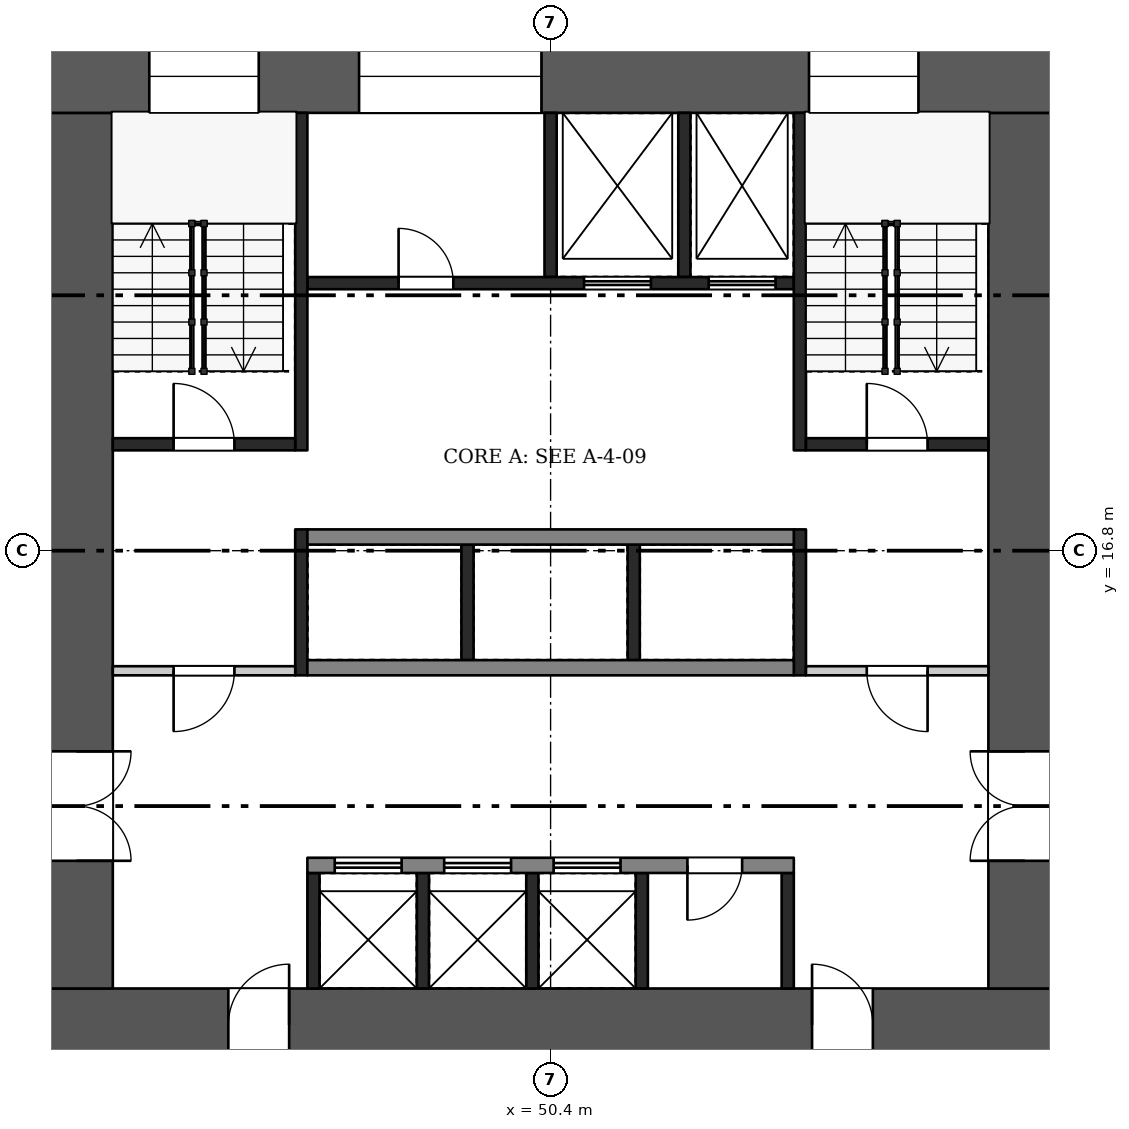
"""IFC4 building model, lengths in metres.
Left out: names, types, materials, properties, quantities, classifications, styles, units other than length and angle.
Written with IfcOpenShell. Run it as: python <this file> out.ifc"""

import sys

from ifc_helpers import new_model, si_unit, direction, frame, frame_2d, origin, place, context, subcontext, project, spatial, rectangle, extrude, element, fill, save


model = new_model("IFC4")
c1 = context("Model", 3, precision=1e-05, world=origin(), true_north=direction((0.0, 1.0)))
c2 = subcontext(c1, "Body", "Model", "MODEL_VIEW")
j1 = project(units=[si_unit("LENGTHUNIT", "METRE"), si_unit("PLANEANGLEUNIT", "RADIAN")], contexts=[c1])
p1 = place(None, origin())
s1 = spatial("IfcSite", under=j1, at=p1, CompositionType="ELEMENT")
p2 = place(p1, origin())
s2 = spatial("IfcBuilding", under=s1, at=p2, CompositionType="ELEMENT")
p3 = place(p2, frame((0.0, 0.0, 25.2)))
s3 = spatial("IfcBuildingStorey", under=s2, at=p3, CompositionType="ELEMENT", Elevation=25.2)
p4 = place(p3, frame((42.0, 9.0, 0.0), z_axis=(0.0, 0.0, 1.0), x_axis=(1.0, 0.0, 0.0)))
e1 = element("IfcWall", 1, at=p4, inside=s3, PredefinedType="SHEAR", context=c2, shape_type="SweptSolid", body=[
    extrude(rectangle(XDim=16.8, YDim=1.2, at=frame_2d((8.4, 0.0))), origin(), (0.0, 0.0, 1.0), 3.22),
])
p5 = place(p4, frame((3.1, 0.0, 0.0)))
e2 = element("IfcOpeningElement", 2, at=p5, cuts=e1, PredefinedType="OPENING", context=c2, shape_type="SweptSolid", body=[
    extrude(rectangle(XDim=1.0, YDim=2.1, at=frame_2d((0.5, 1.05))), frame((0.0, 0.61, 0.0), z_axis=(0.0, -1.0, 0.0), x_axis=(1.0, 0.0, 0.0)), (0.0, 0.0, 1.0), 1.22),
])
p6 = place(p4, frame((12.7, 0.0, 0.0)))
e3 = element("IfcOpeningElement", 3, at=p6, cuts=e1, PredefinedType="OPENING", context=c2, shape_type="SweptSolid", body=[
    extrude(rectangle(XDim=1.0, YDim=2.1, at=frame_2d((0.5, 1.05))), frame((0.0, 0.61, 0.0), z_axis=(0.0, -1.0, 0.0), x_axis=(1.0, 0.0, 0.0)), (0.0, 0.0, 1.0), 1.22),
])
p7 = place(p3, frame((42.0, 24.6, 0.0), z_axis=(0.0, 0.0, 1.0), x_axis=(1.0, 0.0, 0.0)))
e4 = element("IfcWall", 4, at=p7, inside=s3, PredefinedType="SHEAR", context=c2, shape_type="SweptSolid", body=[
    extrude(rectangle(XDim=16.8, YDim=1.2, at=frame_2d((8.4, 0.0))), origin(), (0.0, 0.0, 1.0), 3.22),
])
p8 = place(p7, frame((1.8, 0.0, 0.5)))
e5 = element("IfcOpeningElement", 5, at=p8, cuts=e4, PredefinedType="OPENING", context=c2, shape_type="SweptSolid", body=[
    extrude(rectangle(XDim=1.8, YDim=2.4, at=frame_2d((0.9, 1.2))), frame((0.0, 0.61, 0.0), z_axis=(0.0, -1.0, 0.0), x_axis=(1.0, 0.0, 0.0)), (0.0, 0.0, 1.0), 1.22),
])
p9 = place(p7, frame((5.25, 0.0, 1.6)))
e6 = element("IfcOpeningElement", 6, at=p9, cuts=e4, PredefinedType="OPENING", context=c2, shape_type="SweptSolid", body=[
    extrude(rectangle(XDim=3.0, YDim=1.2, at=frame_2d((1.5, 0.6))), frame((0.0, 0.61, 0.0), z_axis=(0.0, -1.0, 0.0), x_axis=(1.0, 0.0, 0.0)), (0.0, 0.0, 1.0), 1.22),
])
p10 = place(p7, frame((12.65, 0.0, 0.5)))
e7 = element("IfcOpeningElement", 7, at=p10, cuts=e4, PredefinedType="OPENING", context=c2, shape_type="SweptSolid", body=[
    extrude(rectangle(XDim=1.8, YDim=2.4, at=frame_2d((0.9, 1.2))), frame((0.0, 0.61, 0.0), z_axis=(0.0, -1.0, 0.0), x_axis=(1.0, 0.0, 0.0)), (0.0, 0.0, 1.0), 1.22),
])
p11 = place(p3, frame((42.6, 9.6, 0.0), z_axis=(0.0, 0.0, 1.0), x_axis=(0.0, 1.0, 0.0)))
e8 = element("IfcWall", 8, at=p11, inside=s3, PredefinedType="SHEAR", context=c2, shape_type="SweptSolid", body=[
    extrude(rectangle(XDim=14.4, YDim=1.2, at=frame_2d((7.2, 0.0))), origin(), (0.0, 0.0, 1.0), 3.22),
])
p12 = place(p11, frame((2.1, 0.0, 0.0)))
e9 = element("IfcOpeningElement", 9, at=p12, cuts=e8, PredefinedType="OPENING", context=c2, shape_type="SweptSolid", body=[
    extrude(rectangle(XDim=1.8, YDim=2.1, at=frame_2d((0.9, 1.05))), frame((0.0, 0.61, 0.0), z_axis=(0.0, -1.0, 0.0), x_axis=(1.0, 0.0, 0.0)), (0.0, 0.0, 1.0), 1.22),
])
p13 = place(p3, frame((58.2, 9.6, 0.0), z_axis=(0.0, 0.0, 1.0), x_axis=(0.0, 1.0, 0.0)))
e10 = element("IfcWall", 10, at=p13, inside=s3, PredefinedType="SHEAR", context=c2, shape_type="SweptSolid", body=[
    extrude(rectangle(XDim=14.4, YDim=1.2, at=frame_2d((7.2, 0.0))), origin(), (0.0, 0.0, 1.0), 3.22),
])
p14 = place(p13, frame((2.1, 0.0, 0.0)))
e11 = element("IfcOpeningElement", 11, at=p14, cuts=e10, PredefinedType="OPENING", context=c2, shape_type="SweptSolid", body=[
    extrude(rectangle(XDim=1.8, YDim=2.1, at=frame_2d((0.9, 1.05))), frame((0.0, 0.61, 0.0), z_axis=(0.0, -1.0, 0.0), x_axis=(1.0, 0.0, 0.0)), (0.0, 0.0, 1.0), 1.22),
])
for number, where, z_axis, x_axis in (
    (12, (46.5, 9.6, 0.0), (0.0, 0.0, 1.0), (0.0, 1.0, 0.0)),
    (13, (48.3, 9.6, 0.0), (0.0, 0.0, 1.0), (0.0, 1.0, 0.0)),
    (14, (50.1, 9.6, 0.0), (0.0, 0.0, 1.0), (0.0, 1.0, 0.0)),
    (15, (51.9, 9.6, 0.0), (0.0, 0.0, 1.0), (0.0, 1.0, 0.0)),
    (16, (54.3, 9.6, 0.0), (0.0, 0.0, 1.0), (0.0, 1.0, 0.0)),
):
    element("IfcWall", number, at=place(p3, frame(where, z_axis=z_axis, x_axis=x_axis)), inside=s3, PredefinedType="SHEAR", context=c2, shape_type="SweptSolid", body=[
        extrude(rectangle(XDim=1.9, YDim=0.2, at=frame_2d((0.95, 0.0))), origin(), (0.0, 0.0, 1.0), 3.22),
    ])
p15 = place(p3, frame((46.4, 11.625, 0.0), z_axis=(0.0, 0.0, 1.0), x_axis=(1.0, 0.0, 0.0)))
e17 = element("IfcWall", 17, at=p15, inside=s3, PredefinedType="SHEAR", context=c2, shape_type="SweptSolid", body=[
    extrude(rectangle(XDim=8.0, YDim=0.25, at=frame_2d((4.0, 0.0))), origin(), (0.0, 0.0, 1.0), 3.22),
])
p16 = place(p15, frame((0.45, 0.0, 0.0)))
e18 = element("IfcOpeningElement", 18, at=p16, cuts=e17, PredefinedType="OPENING", context=c2, shape_type="SweptSolid", body=[
    extrude(rectangle(XDim=1.1, YDim=2.1, at=frame_2d((0.55, 1.05))), frame((0.0, 0.135, 0.0), z_axis=(0.0, -1.0, 0.0), x_axis=(1.0, 0.0, 0.0)), (0.0, 0.0, 1.0), 0.27),
])
p17 = place(p15, frame((2.25, 0.0, 0.0)))
e19 = element("IfcOpeningElement", 19, at=p17, cuts=e17, PredefinedType="OPENING", context=c2, shape_type="SweptSolid", body=[
    extrude(rectangle(XDim=1.1, YDim=2.1, at=frame_2d((0.55, 1.05))), frame((0.0, 0.135, 0.0), z_axis=(0.0, -1.0, 0.0), x_axis=(1.0, 0.0, 0.0)), (0.0, 0.0, 1.0), 0.27),
])
p18 = place(p15, frame((4.05, 0.0, 0.0)))
e20 = element("IfcOpeningElement", 20, at=p18, cuts=e17, PredefinedType="OPENING", context=c2, shape_type="SweptSolid", body=[
    extrude(rectangle(XDim=1.1, YDim=2.1, at=frame_2d((0.55, 1.05))), frame((0.0, 0.135, 0.0), z_axis=(0.0, -1.0, 0.0), x_axis=(1.0, 0.0, 0.0)), (0.0, 0.0, 1.0), 0.27),
])
p19 = place(p15, frame((6.25, 0.0, 0.0)))
e21 = element("IfcOpeningElement", 21, at=p19, cuts=e17, PredefinedType="OPENING", context=c2, shape_type="SweptSolid", body=[
    extrude(rectangle(XDim=0.9, YDim=2.1, at=frame_2d((0.45, 1.05))), frame((0.0, 0.135, 0.0), z_axis=(0.0, -1.0, 0.0), x_axis=(1.0, 0.0, 0.0)), (0.0, 0.0, 1.0), 0.27),
])
for number, where, z_axis, x_axis in (
    (22, (49.033, 15.0, 0.0), (0.0, 0.0, 1.0), (0.0, 1.0, 0.0)),
    (23, (51.767, 15.0, 0.0), (0.0, 0.0, 1.0), (0.0, 1.0, 0.0)),
):
    element("IfcWall", number, at=place(p3, frame(where, z_axis=z_axis, x_axis=x_axis)), inside=s3, PredefinedType="SHEAR", context=c2, shape_type="SweptSolid", body=[
        extrude(rectangle(XDim=1.9, YDim=0.2, at=frame_2d((0.95, 0.0))), origin(), (0.0, 0.0, 1.0), 3.22),
    ])
for number, where, z_axis, x_axis in (
    (24, (46.4, 14.875, 0.0), (0.0, 0.0, 1.0), (1.0, 0.0, 0.0)),
    (25, (46.4, 17.025, 0.0), (0.0, 0.0, 1.0), (1.0, 0.0, 0.0)),
):
    element("IfcWall", number, at=place(p3, frame(where, z_axis=z_axis, x_axis=x_axis)), inside=s3, PredefinedType="SHEAR", context=c2, shape_type="SweptSolid", body=[
        extrude(rectangle(XDim=8.0, YDim=0.25, at=frame_2d((4.0, 0.0))), origin(), (0.0, 0.0, 1.0), 3.22),
    ])
for number, where, z_axis, x_axis in (
    (26, (50.4, 21.3, 0.0), (0.0, 0.0, 1.0), (0.0, 1.0, 0.0)),
    (27, (52.6, 21.3, 0.0), (0.0, 0.0, 1.0), (0.0, 1.0, 0.0)),
):
    element("IfcWall", number, at=place(p3, frame(where, z_axis=z_axis, x_axis=x_axis)), inside=s3, PredefinedType="SHEAR", context=c2, shape_type="SweptSolid", body=[
        extrude(rectangle(XDim=2.7, YDim=0.2, at=frame_2d((1.35, 0.0))), origin(), (0.0, 0.0, 1.0), 3.22),
    ])
p20 = place(p3, frame((46.4, 21.2, 0.0), z_axis=(0.0, 0.0, 1.0), x_axis=(1.0, 0.0, 0.0)))
e28 = element("IfcWall", 28, at=p20, inside=s3, PredefinedType="SHEAR", context=c2, shape_type="SweptSolid", body=[
    extrude(rectangle(XDim=8.0, YDim=0.2, at=frame_2d((4.0, 0.0))), origin(), (0.0, 0.0, 1.0), 3.22),
])
p21 = place(p20, frame((1.5, 0.0, 0.0)))
e29 = element("IfcOpeningElement", 29, at=p21, cuts=e28, PredefinedType="OPENING", context=c2, shape_type="SweptSolid", body=[
    extrude(rectangle(XDim=0.9, YDim=2.1, at=frame_2d((0.45, 1.05))), frame((0.0, 0.11, 0.0), z_axis=(0.0, -1.0, 0.0), x_axis=(1.0, 0.0, 0.0)), (0.0, 0.0, 1.0), 0.22),
])
p22 = place(p20, frame((4.55, 0.0, 0.0)))
e30 = element("IfcOpeningElement", 30, at=p22, cuts=e28, PredefinedType="OPENING", context=c2, shape_type="SweptSolid", body=[
    extrude(rectangle(XDim=1.1, YDim=2.1, at=frame_2d((0.55, 1.05))), frame((0.0, 0.11, 0.0), z_axis=(0.0, -1.0, 0.0), x_axis=(1.0, 0.0, 0.0)), (0.0, 0.0, 1.0), 0.22),
])
p23 = place(p20, frame((6.6, 0.0, 0.0)))
e31 = element("IfcOpeningElement", 31, at=p23, cuts=e28, PredefinedType="OPENING", context=c2, shape_type="SweptSolid", body=[
    extrude(rectangle(XDim=1.1, YDim=2.1, at=frame_2d((0.55, 1.05))), frame((0.0, 0.11, 0.0), z_axis=(0.0, -1.0, 0.0), x_axis=(1.0, 0.0, 0.0)), (0.0, 0.0, 1.0), 0.22),
])
p24 = place(p3, frame((46.3, 14.75, 0.0), z_axis=(0.0, 0.0, 1.0), x_axis=(0.0, 1.0, 0.0)))
e32 = element("IfcWall", 32, at=p24, inside=s3, PredefinedType="SHEAR", context=c2, shape_type="SweptSolid", body=[
    extrude(rectangle(XDim=2.4, YDim=0.2, at=frame_2d((1.2, 0.0))), origin(), (0.0, 0.0, 1.0), 3.22),
])
p25 = place(p3, frame((46.3, 18.45, 0.0), z_axis=(0.0, 0.0, 1.0), x_axis=(0.0, 1.0, 0.0)))
e33 = element("IfcWall", 33, at=p25, inside=s3, PredefinedType="SHEAR", context=c2, shape_type="SweptSolid", body=[
    extrude(rectangle(XDim=5.55, YDim=0.2, at=frame_2d((2.775, 0.0))), origin(), (0.0, 0.0, 1.0), 3.22),
])
p26 = place(p3, frame((43.2, 14.825, 0.0), z_axis=(0.0, 0.0, 1.0), x_axis=(1.0, 0.0, 0.0)))
e34 = element("IfcWall", 34, at=p26, inside=s3, PredefinedType="PARTITIONING", context=c2, shape_type="SweptSolid", body=[
    extrude(rectangle(XDim=3.0, YDim=0.15, at=frame_2d((1.5, 0.0))), origin(), (0.0, 0.0, 1.0), 3.22),
])
p27 = place(p26, frame((1.0, 0.0, 0.0)))
e35 = element("IfcOpeningElement", 35, at=p27, cuts=e34, PredefinedType="OPENING", context=c2, shape_type="SweptSolid", body=[
    extrude(rectangle(XDim=1.0, YDim=2.1, at=frame_2d((0.5, 1.05))), frame((0.0, 0.085, 0.0), z_axis=(0.0, -1.0, 0.0), x_axis=(1.0, 0.0, 0.0)), (0.0, 0.0, 1.0), 0.17),
])
p28 = place(p3, frame((43.2, 18.55, 0.0), z_axis=(0.0, 0.0, 1.0), x_axis=(1.0, 0.0, 0.0)))
e36 = element("IfcWall", 36, at=p28, inside=s3, PredefinedType="SHEAR", context=c2, shape_type="SweptSolid", body=[
    extrude(rectangle(XDim=3.0, YDim=0.2, at=frame_2d((1.5, 0.0))), origin(), (0.0, 0.0, 1.0), 3.22),
])
p29 = place(p28, frame((1.0, 0.0, 0.0)))
e37 = element("IfcOpeningElement", 37, at=p29, cuts=e36, PredefinedType="OPENING", context=c2, shape_type="SweptSolid", body=[
    extrude(rectangle(XDim=1.0, YDim=2.1, at=frame_2d((0.5, 1.05))), frame((0.0, 0.11, 0.0), z_axis=(0.0, -1.0, 0.0), x_axis=(1.0, 0.0, 0.0)), (0.0, 0.0, 1.0), 0.22),
])
p30 = place(p3, frame((54.5, 14.75, 0.0), z_axis=(0.0, 0.0, 1.0), x_axis=(0.0, 1.0, 0.0)))
e38 = element("IfcWall", 38, at=p30, inside=s3, PredefinedType="SHEAR", context=c2, shape_type="SweptSolid", body=[
    extrude(rectangle(XDim=2.4, YDim=0.2, at=frame_2d((1.2, 0.0))), origin(), (0.0, 0.0, 1.0), 3.22),
])
p31 = place(p3, frame((54.5, 18.45, 0.0), z_axis=(0.0, 0.0, 1.0), x_axis=(0.0, 1.0, 0.0)))
e39 = element("IfcWall", 39, at=p31, inside=s3, PredefinedType="SHEAR", context=c2, shape_type="SweptSolid", body=[
    extrude(rectangle(XDim=5.55, YDim=0.2, at=frame_2d((2.775, 0.0))), origin(), (0.0, 0.0, 1.0), 3.22),
])
p32 = place(p3, frame((54.6, 14.825, 0.0), z_axis=(0.0, 0.0, 1.0), x_axis=(1.0, 0.0, 0.0)))
e40 = element("IfcWall", 40, at=p32, inside=s3, PredefinedType="PARTITIONING", context=c2, shape_type="SweptSolid", body=[
    extrude(rectangle(XDim=3.0, YDim=0.15, at=frame_2d((1.5, 0.0))), origin(), (0.0, 0.0, 1.0), 3.22),
])
p33 = place(p32, frame((1.0, 0.0, 0.0)))
e41 = element("IfcOpeningElement", 41, at=p33, cuts=e40, PredefinedType="OPENING", context=c2, shape_type="SweptSolid", body=[
    extrude(rectangle(XDim=1.0, YDim=2.1, at=frame_2d((0.5, 1.05))), frame((0.0, 0.085, 0.0), z_axis=(0.0, -1.0, 0.0), x_axis=(1.0, 0.0, 0.0)), (0.0, 0.0, 1.0), 0.17),
])
p34 = place(p3, frame((54.6, 18.55, 0.0), z_axis=(0.0, 0.0, 1.0), x_axis=(1.0, 0.0, 0.0)))
e42 = element("IfcWall", 42, at=p34, inside=s3, PredefinedType="SHEAR", context=c2, shape_type="SweptSolid", body=[
    extrude(rectangle(XDim=3.0, YDim=0.2, at=frame_2d((1.5, 0.0))), origin(), (0.0, 0.0, 1.0), 3.22),
])
p35 = place(p34, frame((1.0, 0.0, 0.0)))
e43 = element("IfcOpeningElement", 43, at=p35, cuts=e42, PredefinedType="OPENING", context=c2, shape_type="SweptSolid", body=[
    extrude(rectangle(XDim=1.0, YDim=2.1, at=frame_2d((0.5, 1.05))), frame((0.0, 0.11, 0.0), z_axis=(0.0, -1.0, 0.0), x_axis=(1.0, 0.0, 0.0)), (0.0, 0.0, 1.0), 0.22),
])
p36 = place(p5, origin())
e44 = element("IfcDoor", 44, at=p36, inside=s3, OperationType="SINGLE_SWING_RIGHT", PredefinedType="DOOR", context=c2, shape_type="SweptSolid", body=[
    extrude(rectangle(XDim=1.0, YDim=2.1, at=frame_2d((0.5, 1.05))), frame((0.0, 0.025, 0.0), z_axis=(0.0, -1.0, 0.0), x_axis=(1.0, 0.0, 0.0)), (0.0, 0.0, 1.0), 0.05),
])
fill(e2, e44)
p37 = place(p6, origin())
e45 = element("IfcDoor", 45, at=p37, inside=s3, OperationType="SINGLE_SWING_LEFT", PredefinedType="DOOR", context=c2, shape_type="SweptSolid", body=[
    extrude(rectangle(XDim=1.0, YDim=2.1, at=frame_2d((0.5, 1.05))), frame((0.0, 0.025, 0.0), z_axis=(0.0, -1.0, 0.0), x_axis=(1.0, 0.0, 0.0)), (0.0, 0.0, 1.0), 0.05),
])
fill(e3, e45)
p38 = place(p12, frame((1.8, 0.0, 0.0), z_axis=(0.0, 0.0, 1.0), x_axis=(-1.0, 0.0, 0.0)))
e46 = element("IfcDoor", 46, at=p38, inside=s3, OperationType="DOUBLE_DOOR_SINGLE_SWING", PredefinedType="DOOR", context=c2, shape_type="SweptSolid", body=[
    extrude(rectangle(XDim=1.8, YDim=2.1, at=frame_2d((0.9, 1.05))), frame((0.0, 0.025, 0.0), z_axis=(0.0, -1.0, 0.0), x_axis=(1.0, 0.0, 0.0)), (0.0, 0.0, 1.0), 0.05),
])
fill(e9, e46)
p39 = place(p14, origin())
e47 = element("IfcDoor", 47, at=p39, inside=s3, OperationType="DOUBLE_DOOR_SINGLE_SWING", PredefinedType="DOOR", context=c2, shape_type="SweptSolid", body=[
    extrude(rectangle(XDim=1.8, YDim=2.1, at=frame_2d((0.9, 1.05))), frame((0.0, 0.025, 0.0), z_axis=(0.0, -1.0, 0.0), x_axis=(1.0, 0.0, 0.0)), (0.0, 0.0, 1.0), 0.05),
])
fill(e11, e47)
p40 = place(p16, origin())
e48 = element("IfcDoor", 48, at=p40, inside=s3, OperationType="DOUBLE_DOOR_SLIDING", PredefinedType="DOOR", context=c2, shape_type="SweptSolid", body=[
    extrude(rectangle(XDim=1.1, YDim=2.1, at=frame_2d((0.55, 1.05))), frame((0.0, 0.025, 0.0), z_axis=(0.0, -1.0, 0.0), x_axis=(1.0, 0.0, 0.0)), (0.0, 0.0, 1.0), 0.05),
])
fill(e18, e48)
p41 = place(p17, origin())
e49 = element("IfcDoor", 49, at=p41, inside=s3, OperationType="DOUBLE_DOOR_SLIDING", PredefinedType="DOOR", context=c2, shape_type="SweptSolid", body=[
    extrude(rectangle(XDim=1.1, YDim=2.1, at=frame_2d((0.55, 1.05))), frame((0.0, 0.025, 0.0), z_axis=(0.0, -1.0, 0.0), x_axis=(1.0, 0.0, 0.0)), (0.0, 0.0, 1.0), 0.05),
])
fill(e19, e49)
p42 = place(p18, origin())
e50 = element("IfcDoor", 50, at=p42, inside=s3, OperationType="DOUBLE_DOOR_SLIDING", PredefinedType="DOOR", context=c2, shape_type="SweptSolid", body=[
    extrude(rectangle(XDim=1.1, YDim=2.1, at=frame_2d((0.55, 1.05))), frame((0.0, 0.025, 0.0), z_axis=(0.0, -1.0, 0.0), x_axis=(1.0, 0.0, 0.0)), (0.0, 0.0, 1.0), 0.05),
])
fill(e20, e50)
p43 = place(p19, frame((0.9, 0.0, 0.0), z_axis=(0.0, 0.0, 1.0), x_axis=(-1.0, 0.0, 0.0)))
e51 = element("IfcDoor", 51, at=p43, inside=s3, OperationType="SINGLE_SWING_RIGHT", PredefinedType="DOOR", context=c2, shape_type="SweptSolid", body=[
    extrude(rectangle(XDim=0.9, YDim=2.1, at=frame_2d((0.45, 1.05))), frame((0.0, 0.025, 0.0), z_axis=(0.0, -1.0, 0.0), x_axis=(1.0, 0.0, 0.0)), (0.0, 0.0, 1.0), 0.05),
])
fill(e21, e51)
p44 = place(p21, origin())
e52 = element("IfcDoor", 52, at=p44, inside=s3, OperationType="SINGLE_SWING_LEFT", PredefinedType="DOOR", context=c2, shape_type="SweptSolid", body=[
    extrude(rectangle(XDim=0.9, YDim=2.1, at=frame_2d((0.45, 1.05))), frame((0.0, 0.025, 0.0), z_axis=(0.0, -1.0, 0.0), x_axis=(1.0, 0.0, 0.0)), (0.0, 0.0, 1.0), 0.05),
])
fill(e29, e52)
p45 = place(p22, origin())
e53 = element("IfcDoor", 53, at=p45, inside=s3, OperationType="DOUBLE_DOOR_SLIDING", PredefinedType="DOOR", context=c2, shape_type="SweptSolid", body=[
    extrude(rectangle(XDim=1.1, YDim=2.1, at=frame_2d((0.55, 1.05))), frame((0.0, 0.025, 0.0), z_axis=(0.0, -1.0, 0.0), x_axis=(1.0, 0.0, 0.0)), (0.0, 0.0, 1.0), 0.05),
])
fill(e30, e53)
p46 = place(p23, origin())
e54 = element("IfcDoor", 54, at=p46, inside=s3, OperationType="DOUBLE_DOOR_SLIDING", PredefinedType="DOOR", context=c2, shape_type="SweptSolid", body=[
    extrude(rectangle(XDim=1.1, YDim=2.1, at=frame_2d((0.55, 1.05))), frame((0.0, 0.025, 0.0), z_axis=(0.0, -1.0, 0.0), x_axis=(1.0, 0.0, 0.0)), (0.0, 0.0, 1.0), 0.05),
])
fill(e31, e54)
p47 = place(p27, frame((1.0, 0.0, 0.0), z_axis=(0.0, 0.0, 1.0), x_axis=(-1.0, 0.0, 0.0)))
e55 = element("IfcDoor", 55, at=p47, inside=s3, OperationType="SINGLE_SWING_RIGHT", PredefinedType="DOOR", context=c2, shape_type="SweptSolid", body=[
    extrude(rectangle(XDim=1.0, YDim=2.1, at=frame_2d((0.5, 1.05))), frame((0.0, 0.025, 0.0), z_axis=(0.0, -1.0, 0.0), x_axis=(1.0, 0.0, 0.0)), (0.0, 0.0, 1.0), 0.05),
])
fill(e35, e55)
p48 = place(p29, origin())
e56 = element("IfcDoor", 56, at=p48, inside=s3, OperationType="SINGLE_SWING_LEFT", PredefinedType="DOOR", context=c2, shape_type="SweptSolid", body=[
    extrude(rectangle(XDim=1.0, YDim=2.1, at=frame_2d((0.5, 1.05))), frame((0.0, 0.025, 0.0), z_axis=(0.0, -1.0, 0.0), x_axis=(1.0, 0.0, 0.0)), (0.0, 0.0, 1.0), 0.05),
])
fill(e37, e56)
p49 = place(p33, frame((1.0, 0.0, 0.0), z_axis=(0.0, 0.0, 1.0), x_axis=(-1.0, 0.0, 0.0)))
e57 = element("IfcDoor", 57, at=p49, inside=s3, OperationType="SINGLE_SWING_LEFT", PredefinedType="DOOR", context=c2, shape_type="SweptSolid", body=[
    extrude(rectangle(XDim=1.0, YDim=2.1, at=frame_2d((0.5, 1.05))), frame((0.0, 0.025, 0.0), z_axis=(0.0, -1.0, 0.0), x_axis=(1.0, 0.0, 0.0)), (0.0, 0.0, 1.0), 0.05),
])
fill(e41, e57)
p50 = place(p35, origin())
e58 = element("IfcDoor", 58, at=p50, inside=s3, OperationType="SINGLE_SWING_LEFT", PredefinedType="DOOR", context=c2, shape_type="SweptSolid", body=[
    extrude(rectangle(XDim=1.0, YDim=2.1, at=frame_2d((0.5, 1.05))), frame((0.0, 0.025, 0.0), z_axis=(0.0, -1.0, 0.0), x_axis=(1.0, 0.0, 0.0)), (0.0, 0.0, 1.0), 0.05),
])
fill(e43, e58)
p51 = place(p8, origin())
e59 = element("IfcWindow", 59, at=p51, inside=s3, PartitioningType="SINGLE_PANEL", PredefinedType="WINDOW", context=c2, shape_type="SweptSolid", body=[
    extrude(rectangle(XDim=1.8, YDim=2.4, at=frame_2d((0.9, 1.2))), frame((0.0, 0.03, 0.0), z_axis=(0.0, -1.0, 0.0), x_axis=(1.0, 0.0, 0.0)), (0.0, 0.0, 1.0), 0.06),
])
fill(e5, e59)
p52 = place(p9, origin())
e60 = element("IfcWindow", 60, at=p52, inside=s3, PartitioningType="SINGLE_PANEL", PredefinedType="WINDOW", context=c2, shape_type="SweptSolid", body=[
    extrude(rectangle(XDim=3.0, YDim=1.2, at=frame_2d((1.5, 0.6))), frame((0.0, 0.03, 0.0), z_axis=(0.0, -1.0, 0.0), x_axis=(1.0, 0.0, 0.0)), (0.0, 0.0, 1.0), 0.06),
])
fill(e6, e60)
p53 = place(p10, origin())
e61 = element("IfcWindow", 61, at=p53, inside=s3, PartitioningType="SINGLE_PANEL", PredefinedType="WINDOW", context=c2, shape_type="SweptSolid", body=[
    extrude(rectangle(XDim=1.8, YDim=2.4, at=frame_2d((0.9, 1.2))), frame((0.0, 0.03, 0.0), z_axis=(0.0, -1.0, 0.0), x_axis=(1.0, 0.0, 0.0)), (0.0, 0.0, 1.0), 0.06),
])
fill(e7, e61)
save(model, sys.argv[1])
